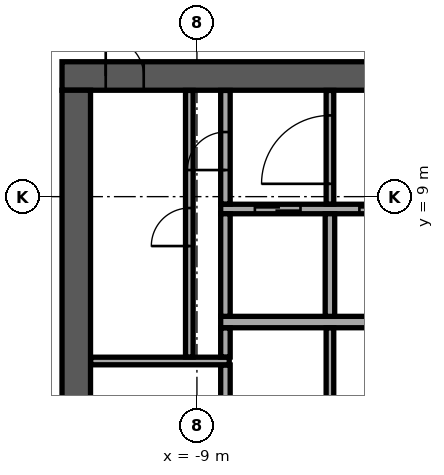
"""IFC4 building model, lengths in metres.
Left out: names, types, materials, properties, quantities, classifications, styles, units other than length and angle.
Written with IfcOpenShell. Run it as: python <this file> out.ifc"""

import sys

from ifc_helpers import new_model, si_unit, direction, frame, frame_2d, origin, place, context, subcontext, project, spatial, rectangle, extrude, element, fill, save


model = new_model("IFC4")
c1 = context("Model", 3, precision=1e-05, world=origin(), true_north=direction((0.0, 1.0)))
c2 = subcontext(c1, "Body", "Model", "MODEL_VIEW")
j1 = project(units=[si_unit("LENGTHUNIT", "METRE"), si_unit("PLANEANGLEUNIT", "RADIAN")], contexts=[c1])
p1 = place(None, origin())
s1 = spatial("IfcSite", under=j1, at=p1, CompositionType="ELEMENT")
p2 = place(p1, origin())
s2 = spatial("IfcBuilding", under=s1, at=p2, CompositionType="ELEMENT")
p3 = place(p2, frame((0.0, 0.0, 246.9)))
s3 = spatial("IfcBuildingStorey", under=s2, at=p3, CompositionType="ELEMENT", Elevation=246.9)
p4 = place(p3, frame((-12.55, 12.175, 0.0), z_axis=(0.0, 0.0, 1.0), x_axis=(1.0, 0.0, 0.0)))
e1 = element("IfcWall", 1, at=p4, inside=s3, PredefinedType="SHEAR", context=c2, shape_type="SweptSolid", body=[
    extrude(rectangle(XDim=25.1, YDim=0.75, at=frame_2d((12.55, 0.0))), origin(), (0.0, 0.0, 1.0), 3.64),
])
p5 = place(p4, frame((11.35, 0.0, 0.0)))
e2 = element("IfcOpeningElement", 2, at=p5, cuts=e1, PredefinedType="OPENING", context=c2, shape_type="SweptSolid", body=[
    extrude(rectangle(XDim=2.4, YDim=2.4, at=frame_2d((1.2, 1.2))), frame((0.0, 0.385, 0.0), z_axis=(0.0, -1.0, 0.0), x_axis=(1.0, 0.0, 0.0)), (0.0, 0.0, 1.0), 0.77),
])
p6 = place(p4, frame((22.175, 0.0, 0.0)))
e3 = element("IfcOpeningElement", 3, at=p6, cuts=e1, PredefinedType="OPENING", context=c2, shape_type="SweptSolid", body=[
    extrude(rectangle(XDim=1.2, YDim=2.1, at=frame_2d((0.6, 1.05))), frame((0.0, 0.385, 0.0), z_axis=(0.0, -1.0, 0.0), x_axis=(1.0, 0.0, 0.0)), (0.0, 0.0, 1.0), 0.77),
])
p7 = place(p4, frame((1.15, 0.0, 0.0)))
e4 = element("IfcOpeningElement", 4, at=p7, cuts=e1, PredefinedType="OPENING", context=c2, shape_type="SweptSolid", body=[
    extrude(rectangle(XDim=1.0, YDim=2.1, at=frame_2d((0.5, 1.05))), frame((0.0, 0.385, 0.0), z_axis=(0.0, -1.0, 0.0), x_axis=(1.0, 0.0, 0.0)), (0.0, 0.0, 1.0), 0.77),
])
p8 = place(p3, frame((-12.175, -11.8, 0.0), z_axis=(0.0, 0.0, 1.0), x_axis=(0.0, 1.0, 0.0)))
e5 = element("IfcWall", 5, at=p8, inside=s3, PredefinedType="SHEAR", context=c2, shape_type="SweptSolid", body=[
    extrude(rectangle(XDim=23.6, YDim=0.75, at=frame_2d((11.8, 0.0))), origin(), (0.0, 0.0, 1.0), 3.64),
])
p9 = place(p8, frame((10.6, 0.0, 0.0)))
e6 = element("IfcOpeningElement", 6, at=p9, cuts=e5, PredefinedType="OPENING", context=c2, shape_type="SweptSolid", body=[
    extrude(rectangle(XDim=2.4, YDim=2.4, at=frame_2d((1.2, 1.2))), frame((0.0, 0.385, 0.0), z_axis=(0.0, -1.0, 0.0), x_axis=(1.0, 0.0, 0.0)), (0.0, 0.0, 1.0), 0.77),
])
p10 = place(p3, frame((-8.375, 5.7, 0.0), z_axis=(0.0, 0.0, 1.0), x_axis=(1.0, 0.0, 0.0)))
e7 = element("IfcWall", 7, at=p10, inside=s3, PredefinedType="SOLIDWALL", context=c2, shape_type="SweptSolid", body=[
    extrude(rectangle(XDim=16.75, YDim=0.3, at=frame_2d((8.375, 0.0))), origin(), (0.0, 0.0, 1.0), 3.64),
])
p11 = place(p3, frame((-8.375, 8.675, 0.0), z_axis=(0.0, 0.0, 1.0), x_axis=(1.0, 0.0, 0.0)))
e8 = element("IfcWall", 8, at=p11, inside=s3, PredefinedType="SOLIDWALL", context=c2, shape_type="SweptSolid", body=[
    extrude(rectangle(XDim=16.75, YDim=0.25, at=frame_2d((8.375, 0.0))), origin(), (0.0, 0.0, 1.0), 3.64),
])
p12 = place(p11, frame((0.9, 0.0, 0.0)))
e9 = element("IfcOpeningElement", 9, at=p12, cuts=e8, PredefinedType="OPENING", context=c2, shape_type="SweptSolid", body=[
    extrude(rectangle(XDim=1.2, YDim=2.1, at=frame_2d((0.6, 1.05))), frame((0.0, 0.135, 0.0), z_axis=(0.0, -1.0, 0.0), x_axis=(1.0, 0.0, 0.0)), (0.0, 0.0, 1.0), 0.27),
])
p13 = place(p11, frame((3.65, 0.0, 0.0)))
e10 = element("IfcOpeningElement", 10, at=p13, cuts=e8, PredefinedType="OPENING", context=c2, shape_type="SweptSolid", body=[
    extrude(rectangle(XDim=1.2, YDim=2.1, at=frame_2d((0.6, 1.05))), frame((0.0, 0.135, 0.0), z_axis=(0.0, -1.0, 0.0), x_axis=(1.0, 0.0, 0.0)), (0.0, 0.0, 1.0), 0.27),
])
p14 = place(p11, frame((6.4, 0.0, 0.0)))
e11 = element("IfcOpeningElement", 11, at=p14, cuts=e8, PredefinedType="OPENING", context=c2, shape_type="SweptSolid", body=[
    extrude(rectangle(XDim=1.2, YDim=2.1, at=frame_2d((0.6, 1.05))), frame((0.0, 0.135, 0.0), z_axis=(0.0, -1.0, 0.0), x_axis=(1.0, 0.0, 0.0)), (0.0, 0.0, 1.0), 0.27),
])
p15 = place(p11, frame((9.15, 0.0, 0.0)))
e12 = element("IfcOpeningElement", 12, at=p15, cuts=e8, PredefinedType="OPENING", context=c2, shape_type="SweptSolid", body=[
    extrude(rectangle(XDim=1.2, YDim=2.1, at=frame_2d((0.6, 1.05))), frame((0.0, 0.135, 0.0), z_axis=(0.0, -1.0, 0.0), x_axis=(1.0, 0.0, 0.0)), (0.0, 0.0, 1.0), 0.27),
])
p16 = place(p11, frame((11.9, 0.0, 0.0)))
e13 = element("IfcOpeningElement", 13, at=p16, cuts=e8, PredefinedType="OPENING", context=c2, shape_type="SweptSolid", body=[
    extrude(rectangle(XDim=1.2, YDim=2.1, at=frame_2d((0.6, 1.05))), frame((0.0, 0.135, 0.0), z_axis=(0.0, -1.0, 0.0), x_axis=(1.0, 0.0, 0.0)), (0.0, 0.0, 1.0), 0.27),
])
p17 = place(p11, frame((14.65, 0.0, 0.0)))
e14 = element("IfcOpeningElement", 14, at=p17, cuts=e8, PredefinedType="OPENING", context=c2, shape_type="SweptSolid", body=[
    extrude(rectangle(XDim=1.2, YDim=2.1, at=frame_2d((0.6, 1.05))), frame((0.0, 0.135, 0.0), z_axis=(0.0, -1.0, 0.0), x_axis=(1.0, 0.0, 0.0)), (0.0, 0.0, 1.0), 0.27),
])
for number, where, z_axis, x_axis in (
    (15, (-8.25, 5.85, 0.0), (0.0, 0.0, 1.0), (0.0, 1.0, 0.0)),
    (16, (-5.5, 5.85, 0.0), (0.0, 0.0, 1.0), (0.0, 1.0, 0.0)),
):
    element("IfcWall", number, at=place(p3, frame(where, z_axis=z_axis, x_axis=x_axis)), inside=s3, PredefinedType="SOLIDWALL", context=c2, shape_type="SweptSolid", body=[
        extrude(rectangle(XDim=2.7, YDim=0.25, at=frame_2d((1.35, 0.0))), origin(), (0.0, 0.0, 1.0), 3.64),
    ])
p18 = place(p3, frame((-8.25, 2.855, 0.0), z_axis=(0.0, 0.0, 1.0), x_axis=(0.0, 1.0, 0.0)))
e17 = element("IfcWall", 17, at=p18, inside=s3, PredefinedType="PARTITIONING", context=c2, shape_type="SweptSolid", body=[
    extrude(rectangle(XDim=1.715, YDim=0.25, at=frame_2d((0.857, 0.0))), origin(), (0.0, 0.0, 1.0), 3.64),
])
p19 = place(p3, frame((-5.5, 2.855, 0.0), z_axis=(0.0, 0.0, 1.0), x_axis=(0.0, 1.0, 0.0)))
e18 = element("IfcWall", 18, at=p19, inside=s3, PredefinedType="PARTITIONING", context=c2, shape_type="SweptSolid", body=[
    extrude(rectangle(XDim=2.69, YDim=0.2, at=frame_2d((1.345, 0.0))), origin(), (0.0, 0.0, 1.0), 3.64),
])
p20 = place(p3, frame((-11.795, 4.675, 0.0), z_axis=(0.0, 0.0, 1.0), x_axis=(1.0, 0.0, 0.0)))
e19 = element("IfcWall", 19, at=p20, inside=s3, PredefinedType="PARTITIONING", context=c2, shape_type="SweptSolid", body=[
    extrude(rectangle(XDim=3.645, YDim=0.2, at=frame_2d((1.823, 0.0))), origin(), (0.0, 0.0, 1.0), 3.64),
])
p21 = place(p3, frame((-9.2, 4.78, 0.0), z_axis=(0.0, 0.0, 1.0), x_axis=(0.0, 1.0, 0.0)))
e20 = element("IfcWall", 20, at=p21, inside=s3, PredefinedType="PARTITIONING", context=c2, shape_type="SweptSolid", body=[
    extrude(rectangle(XDim=7.015, YDim=0.2, at=frame_2d((3.507, 0.0))), origin(), (0.0, 0.0, 1.0), 3.64),
])
p22 = place(p21, frame((2.92, 0.0, 0.0)))
e21 = element("IfcOpeningElement", 21, at=p22, cuts=e20, PredefinedType="OPENING", context=c2, shape_type="SweptSolid", body=[
    extrude(rectangle(XDim=1.0, YDim=2.1, at=frame_2d((0.5, 1.05))), frame((0.0, 0.11, 0.0), z_axis=(0.0, -1.0, 0.0), x_axis=(1.0, 0.0, 0.0)), (0.0, 0.0, 1.0), 0.22),
])
p23 = place(p3, frame((-8.25, 4.78, 0.0), z_axis=(0.0, 0.0, 1.0), x_axis=(0.0, 1.0, 0.0)))
e22 = element("IfcWall", 22, at=p23, inside=s3, PredefinedType="PARTITIONING", context=c2, shape_type="SweptSolid", body=[
    extrude(rectangle(XDim=0.765, YDim=0.25, at=frame_2d((0.382, 0.0))), origin(), (0.0, 0.0, 1.0), 3.64),
])
p24 = place(p3, frame((-8.25, 8.805, 0.0), z_axis=(0.0, 0.0, 1.0), x_axis=(0.0, 1.0, 0.0)))
e23 = element("IfcWall", 23, at=p24, inside=s3, PredefinedType="PARTITIONING", context=c2, shape_type="SweptSolid", body=[
    extrude(rectangle(XDim=2.99, YDim=0.25, at=frame_2d((1.495, 0.0))), origin(), (0.0, 0.0, 1.0), 3.64),
])
p25 = place(p24, frame((0.895, 0.0, 0.0)))
e24 = element("IfcOpeningElement", 24, at=p25, cuts=e23, PredefinedType="OPENING", context=c2, shape_type="SweptSolid", body=[
    extrude(rectangle(XDim=1.0, YDim=2.1, at=frame_2d((0.5, 1.05))), frame((0.0, 0.135, 0.0), z_axis=(0.0, -1.0, 0.0), x_axis=(1.0, 0.0, 0.0)), (0.0, 0.0, 1.0), 0.27),
])
p26 = place(p3, frame((-5.5, 8.805, 0.0), z_axis=(0.0, 0.0, 1.0), x_axis=(0.0, 1.0, 0.0)))
e25 = element("IfcWall", 25, at=p26, inside=s3, PredefinedType="PARTITIONING", context=c2, shape_type="SweptSolid", body=[
    extrude(rectangle(XDim=2.99, YDim=0.2, at=frame_2d((1.495, 0.0))), origin(), (0.0, 0.0, 1.0), 3.64),
])
p27 = place(p26, frame((0.532, 0.0, 0.0)))
e26 = element("IfcOpeningElement", 26, at=p27, cuts=e25, PredefinedType="OPENING", context=c2, shape_type="SweptSolid", body=[
    extrude(rectangle(XDim=1.8, YDim=2.1, at=frame_2d((0.9, 1.05))), frame((0.0, 0.11, 0.0), z_axis=(0.0, -1.0, 0.0), x_axis=(1.0, 0.0, 0.0)), (0.0, 0.0, 1.0), 0.22),
])
p28 = place(p3, frame((-5.115, 33.491, 0.0), z_axis=(0.0, 0.0, 1.0), x_axis=(-0.57357740375, -0.819151366908, 0.0)))
e27 = element("IfcWall", 27, at=p28, inside=s3, PredefinedType="STANDARD", context=c2, shape_type="SweptSolid", body=[
    extrude(rectangle(XDim=48.843, YDim=0.6, at=frame_2d((24.422, 0.0))), origin(), (0.0, 0.0, 1.0), 3.64),
])
p29 = place(p28, frame((1.22, 0.0, 0.9)))
e28 = element("IfcOpeningElement", 28, at=p29, cuts=e27, PredefinedType="OPENING", context=c2, shape_type="SweptSolid", body=[
    extrude(rectangle(XDim=2.0, YDim=2.1, at=frame_2d((1.0, 1.05))), frame((0.0, 0.31, 0.0), z_axis=(0.0, -1.0, 0.0), x_axis=(1.0, 0.0, 0.0)), (0.0, 0.0, 1.0), 0.62),
])
p30 = place(p28, frame((5.66, 0.0, 0.9)))
e29 = element("IfcOpeningElement", 29, at=p30, cuts=e27, PredefinedType="OPENING", context=c2, shape_type="SweptSolid", body=[
    extrude(rectangle(XDim=2.0, YDim=2.1, at=frame_2d((1.0, 1.05))), frame((0.0, 0.31, 0.0), z_axis=(0.0, -1.0, 0.0), x_axis=(1.0, 0.0, 0.0)), (0.0, 0.0, 1.0), 0.62),
])
p31 = place(p28, frame((10.101, 0.0, 0.9)))
e30 = element("IfcOpeningElement", 30, at=p31, cuts=e27, PredefinedType="OPENING", context=c2, shape_type="SweptSolid", body=[
    extrude(rectangle(XDim=2.0, YDim=2.1, at=frame_2d((1.0, 1.05))), frame((0.0, 0.31, 0.0), z_axis=(0.0, -1.0, 0.0), x_axis=(1.0, 0.0, 0.0)), (0.0, 0.0, 1.0), 0.62),
])
p32 = place(p28, frame((14.541, 0.0, 0.9)))
e31 = element("IfcOpeningElement", 31, at=p32, cuts=e27, PredefinedType="OPENING", context=c2, shape_type="SweptSolid", body=[
    extrude(rectangle(XDim=2.0, YDim=2.1, at=frame_2d((1.0, 1.05))), frame((0.0, 0.31, 0.0), z_axis=(0.0, -1.0, 0.0), x_axis=(1.0, 0.0, 0.0)), (0.0, 0.0, 1.0), 0.62),
])
p33 = place(p28, frame((18.981, 0.0, 0.9)))
e32 = element("IfcOpeningElement", 32, at=p33, cuts=e27, PredefinedType="OPENING", context=c2, shape_type="SweptSolid", body=[
    extrude(rectangle(XDim=2.0, YDim=2.1, at=frame_2d((1.0, 1.05))), frame((0.0, 0.31, 0.0), z_axis=(0.0, -1.0, 0.0), x_axis=(1.0, 0.0, 0.0)), (0.0, 0.0, 1.0), 0.62),
])
p34 = place(p28, frame((23.422, 0.0, 0.9)))
e33 = element("IfcOpeningElement", 33, at=p34, cuts=e27, PredefinedType="OPENING", context=c2, shape_type="SweptSolid", body=[
    extrude(rectangle(XDim=2.0, YDim=2.1, at=frame_2d((1.0, 1.05))), frame((0.0, 0.31, 0.0), z_axis=(0.0, -1.0, 0.0), x_axis=(1.0, 0.0, 0.0)), (0.0, 0.0, 1.0), 0.62),
])
p35 = place(p28, frame((27.862, 0.0, 0.9)))
e34 = element("IfcOpeningElement", 34, at=p35, cuts=e27, PredefinedType="OPENING", context=c2, shape_type="SweptSolid", body=[
    extrude(rectangle(XDim=2.0, YDim=2.1, at=frame_2d((1.0, 1.05))), frame((0.0, 0.31, 0.0), z_axis=(0.0, -1.0, 0.0), x_axis=(1.0, 0.0, 0.0)), (0.0, 0.0, 1.0), 0.62),
])
p36 = place(p28, frame((32.302, 0.0, 0.9)))
e35 = element("IfcOpeningElement", 35, at=p36, cuts=e27, PredefinedType="OPENING", context=c2, shape_type="SweptSolid", body=[
    extrude(rectangle(XDim=2.0, YDim=2.1, at=frame_2d((1.0, 1.05))), frame((0.0, 0.31, 0.0), z_axis=(0.0, -1.0, 0.0), x_axis=(1.0, 0.0, 0.0)), (0.0, 0.0, 1.0), 0.62),
])
p37 = place(p28, frame((36.742, 0.0, 0.9)))
e36 = element("IfcOpeningElement", 36, at=p37, cuts=e27, PredefinedType="OPENING", context=c2, shape_type="SweptSolid", body=[
    extrude(rectangle(XDim=2.0, YDim=2.1, at=frame_2d((1.0, 1.05))), frame((0.0, 0.31, 0.0), z_axis=(0.0, -1.0, 0.0), x_axis=(1.0, 0.0, 0.0)), (0.0, 0.0, 1.0), 0.62),
])
p38 = place(p28, frame((41.183, 0.0, 0.9)))
e37 = element("IfcOpeningElement", 37, at=p38, cuts=e27, PredefinedType="OPENING", context=c2, shape_type="SweptSolid", body=[
    extrude(rectangle(XDim=2.0, YDim=2.1, at=frame_2d((1.0, 1.05))), frame((0.0, 0.31, 0.0), z_axis=(0.0, -1.0, 0.0), x_axis=(1.0, 0.0, 0.0)), (0.0, 0.0, 1.0), 0.62),
])
p39 = place(p28, frame((45.623, 0.0, 0.9)))
e38 = element("IfcOpeningElement", 38, at=p39, cuts=e27, PredefinedType="OPENING", context=c2, shape_type="SweptSolid", body=[
    extrude(rectangle(XDim=2.0, YDim=2.1, at=frame_2d((1.0, 1.05))), frame((0.0, 0.31, 0.0), z_axis=(0.0, -1.0, 0.0), x_axis=(1.0, 0.0, 0.0)), (0.0, 0.0, 1.0), 0.62),
])
p40 = place(p7, origin())
e39 = element("IfcDoor", 39, at=p40, inside=s3, OperationType="SINGLE_SWING_LEFT", PredefinedType="DOOR", context=c2, shape_type="SweptSolid", body=[
    extrude(rectangle(XDim=1.0, YDim=2.1, at=frame_2d((0.5, 1.05))), frame((0.0, 0.025, 0.0), z_axis=(0.0, -1.0, 0.0), x_axis=(1.0, 0.0, 0.0)), (0.0, 0.0, 1.0), 0.05),
])
fill(e4, e39)
p41 = place(p12, origin())
e40 = element("IfcDoor", 40, at=p41, inside=s3, OperationType="DOUBLE_DOOR_SLIDING", PredefinedType="DOOR", context=c2, shape_type="SweptSolid", body=[
    extrude(rectangle(XDim=1.2, YDim=2.1, at=frame_2d((0.6, 1.05))), frame((0.0, 0.025, 0.0), z_axis=(0.0, -1.0, 0.0), x_axis=(1.0, 0.0, 0.0)), (0.0, 0.0, 1.0), 0.05),
])
fill(e9, e40)
p42 = place(p13, origin())
e41 = element("IfcDoor", 41, at=p42, inside=s3, OperationType="DOUBLE_DOOR_SLIDING", PredefinedType="DOOR", context=c2, shape_type="SweptSolid", body=[
    extrude(rectangle(XDim=1.2, YDim=2.1, at=frame_2d((0.6, 1.05))), frame((0.0, 0.025, 0.0), z_axis=(0.0, -1.0, 0.0), x_axis=(1.0, 0.0, 0.0)), (0.0, 0.0, 1.0), 0.05),
])
fill(e10, e41)
p43 = place(p22, origin())
e42 = element("IfcDoor", 42, at=p43, inside=s3, OperationType="SINGLE_SWING_LEFT", PredefinedType="DOOR", context=c2, shape_type="SweptSolid", body=[
    extrude(rectangle(XDim=1.0, YDim=2.1, at=frame_2d((0.5, 1.05))), frame((0.0, 0.025, 0.0), z_axis=(0.0, -1.0, 0.0), x_axis=(1.0, 0.0, 0.0)), (0.0, 0.0, 1.0), 0.05),
])
fill(e21, e42)
p44 = place(p25, origin())
e43 = element("IfcDoor", 43, at=p44, inside=s3, OperationType="SINGLE_SWING_LEFT", PredefinedType="DOOR", context=c2, shape_type="SweptSolid", body=[
    extrude(rectangle(XDim=1.0, YDim=2.1, at=frame_2d((0.5, 1.05))), frame((0.0, 0.025, 0.0), z_axis=(0.0, -1.0, 0.0), x_axis=(1.0, 0.0, 0.0)), (0.0, 0.0, 1.0), 0.05),
])
fill(e24, e43)
p45 = place(p27, origin())
e44 = element("IfcDoor", 44, at=p45, inside=s3, OperationType="SINGLE_SWING_LEFT", PredefinedType="DOOR", context=c2, shape_type="SweptSolid", body=[
    extrude(rectangle(XDim=1.8, YDim=2.1, at=frame_2d((0.9, 1.05))), frame((0.0, 0.025, 0.0), z_axis=(0.0, -1.0, 0.0), x_axis=(1.0, 0.0, 0.0)), (0.0, 0.0, 1.0), 0.05),
])
fill(e26, e44)
save(model, sys.argv[1])
